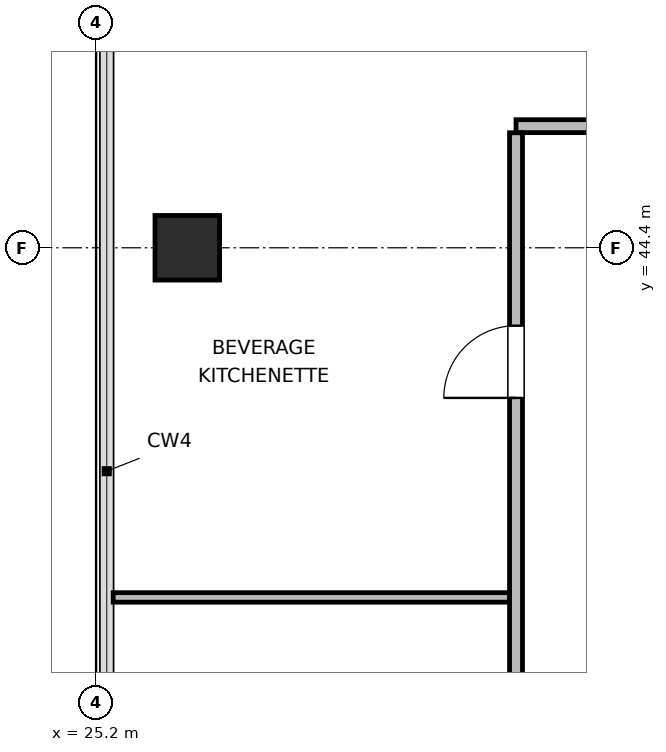
"""IFC4 building model, lengths in metres.
Left out: names, types, materials, properties, quantities, classifications, styles, units other than length and angle.
Written with IfcOpenShell. Run it as: python <this file> out.ifc"""

import sys

from ifc_helpers import new_model, si_unit, direction, frame, frame_2d, origin, origin_2d, place, context, subcontext, project, spatial, rectangle, extrude, element, fill, save


model = new_model("IFC4")
c1 = context("Model", 3, precision=1e-05, world=origin(), true_north=direction((0.0, 1.0)))
c2 = subcontext(c1, "Body", "Model", "MODEL_VIEW")
j1 = project(units=[si_unit("LENGTHUNIT", "METRE"), si_unit("PLANEANGLEUNIT", "RADIAN")], contexts=[c1])
p1 = place(None, origin())
s1 = spatial("IfcSite", under=j1, at=p1, CompositionType="ELEMENT")
p2 = place(p1, origin())
s2 = spatial("IfcBuilding", under=s1, at=p2, CompositionType="ELEMENT")
p3 = place(p2, frame((0.0, 0.0, 302.4)))
s3 = spatial("IfcBuildingStorey", under=s2, at=p3, CompositionType="ELEMENT", Elevation=302.4)
p4 = place(p3, frame((26.4, 44.4, 0.0), z_axis=(0.0, 0.0, 1.0), x_axis=(1.0, 0.0, 0.0)))
e1 = element("IfcColumn", 1, at=p4, inside=s3, PredefinedType="COLUMN", context=c2, shape_type="SweptSolid", body=[
    extrude(rectangle(XDim=0.85, YDim=0.85, at=origin_2d()), origin(), (0.0, 0.0, 1.0), 3.9),
])
p5 = place(p3, frame((30.725, 46.0, 0.0), z_axis=(0.0, 0.0, 1.0), x_axis=(1.0, 0.0, 0.0)))
e2 = element("IfcWall", 2, at=p5, inside=s3, PredefinedType="PARTITIONING", context=c2, shape_type="SweptSolid", body=[
    extrude(rectangle(XDim=32.875, YDim=0.17, at=frame_2d((16.438, 0.0))), origin(), (0.0, 0.0, 1.0), 3.68),
])
p6 = place(p5, frame((1.962, 0.0, 0.0)))
e3 = element("IfcOpeningElement", 3, at=p6, cuts=e2, PredefinedType="OPENING", context=c2, shape_type="SweptSolid", body=[
    extrude(rectangle(XDim=0.95, YDim=2.04, at=frame_2d((0.475, 1.02))), frame((0.0, 0.095, 0.0), z_axis=(0.0, -1.0, 0.0), x_axis=(1.0, 0.0, 0.0)), (0.0, 0.0, 1.0), 0.19),
])
p7 = place(p5, frame((6.4, 0.0, 0.0)))
e4 = element("IfcOpeningElement", 4, at=p7, cuts=e2, PredefinedType="OPENING", context=c2, shape_type="SweptSolid", body=[
    extrude(rectangle(XDim=0.95, YDim=2.04, at=frame_2d((0.475, 1.02))), frame((0.0, 0.095, 0.0), z_axis=(0.0, -1.0, 0.0), x_axis=(1.0, 0.0, 0.0)), (0.0, 0.0, 1.0), 0.19),
])
p8 = place(p5, frame((12.0, 0.0, 0.0)))
e5 = element("IfcOpeningElement", 5, at=p8, cuts=e2, PredefinedType="OPENING", context=c2, shape_type="SweptSolid", body=[
    extrude(rectangle(XDim=0.95, YDim=2.04, at=frame_2d((0.475, 1.02))), frame((0.0, 0.095, 0.0), z_axis=(0.0, -1.0, 0.0), x_axis=(1.0, 0.0, 0.0)), (0.0, 0.0, 1.0), 0.19),
])
p9 = place(p5, frame((18.7, 0.0, 0.0)))
e6 = element("IfcOpeningElement", 6, at=p9, cuts=e2, PredefinedType="OPENING", context=c2, shape_type="SweptSolid", body=[
    extrude(rectangle(XDim=0.95, YDim=2.04, at=frame_2d((0.475, 1.02))), frame((0.0, 0.095, 0.0), z_axis=(0.0, -1.0, 0.0), x_axis=(1.0, 0.0, 0.0)), (0.0, 0.0, 1.0), 0.19),
])
p10 = place(p5, frame((23.7, 0.0, 0.0)))
e7 = element("IfcOpeningElement", 7, at=p10, cuts=e2, PredefinedType="OPENING", context=c2, shape_type="SweptSolid", body=[
    extrude(rectangle(XDim=0.95, YDim=2.04, at=frame_2d((0.475, 1.02))), frame((0.0, 0.095, 0.0), z_axis=(0.0, -1.0, 0.0), x_axis=(1.0, 0.0, 0.0)), (0.0, 0.0, 1.0), 0.19),
])
p11 = place(p5, frame((27.4, 0.0, 0.0)))
e8 = element("IfcOpeningElement", 8, at=p11, cuts=e2, PredefinedType="OPENING", context=c2, shape_type="SweptSolid", body=[
    extrude(rectangle(XDim=0.95, YDim=2.04, at=frame_2d((0.475, 1.02))), frame((0.0, 0.095, 0.0), z_axis=(0.0, -1.0, 0.0), x_axis=(1.0, 0.0, 0.0)), (0.0, 0.0, 1.0), 0.19),
])
p12 = place(p5, frame((30.8, 0.0, 0.0)))
e9 = element("IfcOpeningElement", 9, at=p12, cuts=e2, PredefinedType="OPENING", context=c2, shape_type="SweptSolid", body=[
    extrude(rectangle(XDim=0.95, YDim=2.04, at=frame_2d((0.475, 1.02))), frame((0.0, 0.095, 0.0), z_axis=(0.0, -1.0, 0.0), x_axis=(1.0, 0.0, 0.0)), (0.0, 0.0, 1.0), 0.19),
])
p13 = place(p3, frame((30.725, 26.087, 0.0), z_axis=(0.0, 0.0, 1.0), x_axis=(0.0, 1.0, 0.0)))
e10 = element("IfcWall", 10, at=p13, inside=s3, PredefinedType="PARTITIONING", context=c2, shape_type="SweptSolid", body=[
    extrude(rectangle(XDim=19.826, YDim=0.17, at=frame_2d((9.913, 0.0))), origin(), (0.0, 0.0, 1.0), 3.68),
])
p14 = place(p13, frame((3.138, 0.0, 0.0)))
e11 = element("IfcOpeningElement", 11, at=p14, cuts=e10, PredefinedType="OPENING", context=c2, shape_type="SweptSolid", body=[
    extrude(rectangle(XDim=0.95, YDim=2.04, at=frame_2d((0.475, 1.02))), frame((0.0, 0.095, 0.0), z_axis=(0.0, -1.0, 0.0), x_axis=(1.0, 0.0, 0.0)), (0.0, 0.0, 1.0), 0.19),
])
p15 = place(p13, frame((10.038, 0.0, 0.0)))
e12 = element("IfcOpeningElement", 12, at=p15, cuts=e10, PredefinedType="OPENING", context=c2, shape_type="SweptSolid", body=[
    extrude(rectangle(XDim=0.95, YDim=2.04, at=frame_2d((0.475, 1.02))), frame((0.0, 0.095, 0.0), z_axis=(0.0, -1.0, 0.0), x_axis=(1.0, 0.0, 0.0)), (0.0, 0.0, 1.0), 0.19),
])
p16 = place(p13, frame((16.338, 0.0, 0.0)))
e13 = element("IfcOpeningElement", 13, at=p16, cuts=e10, PredefinedType="OPENING", context=c2, shape_type="SweptSolid", body=[
    extrude(rectangle(XDim=0.95, YDim=2.04, at=frame_2d((0.475, 1.02))), frame((0.0, 0.095, 0.0), z_axis=(0.0, -1.0, 0.0), x_axis=(1.0, 0.0, 0.0)), (0.0, 0.0, 1.0), 0.19),
])
p17 = place(p3, frame((25.425, 39.8, 0.0), z_axis=(0.0, 0.0, 1.0), x_axis=(1.0, 0.0, 0.0)))
e14 = element("IfcWall", 14, at=p17, inside=s3, PredefinedType="PARTITIONING", context=c2, shape_type="SweptSolid", body=[
    extrude(rectangle(XDim=5.213, YDim=0.125, at=frame_2d((2.606, 0.0))), origin(), (0.0, 0.0, 1.0), 3.68),
])
p18 = place(p16, origin())
e15 = element("IfcDoor", 15, at=p18, inside=s3, OperationType="SINGLE_SWING_LEFT", PredefinedType="DOOR", context=c2, shape_type="SweptSolid", body=[
    extrude(rectangle(XDim=0.95, YDim=2.04, at=frame_2d((0.475, 1.02))), frame((0.0, 0.025, 0.0), z_axis=(0.0, -1.0, 0.0), x_axis=(1.0, 0.0, 0.0)), (0.0, 0.0, 1.0), 0.05),
])
fill(e13, e15)
save(model, sys.argv[1])
